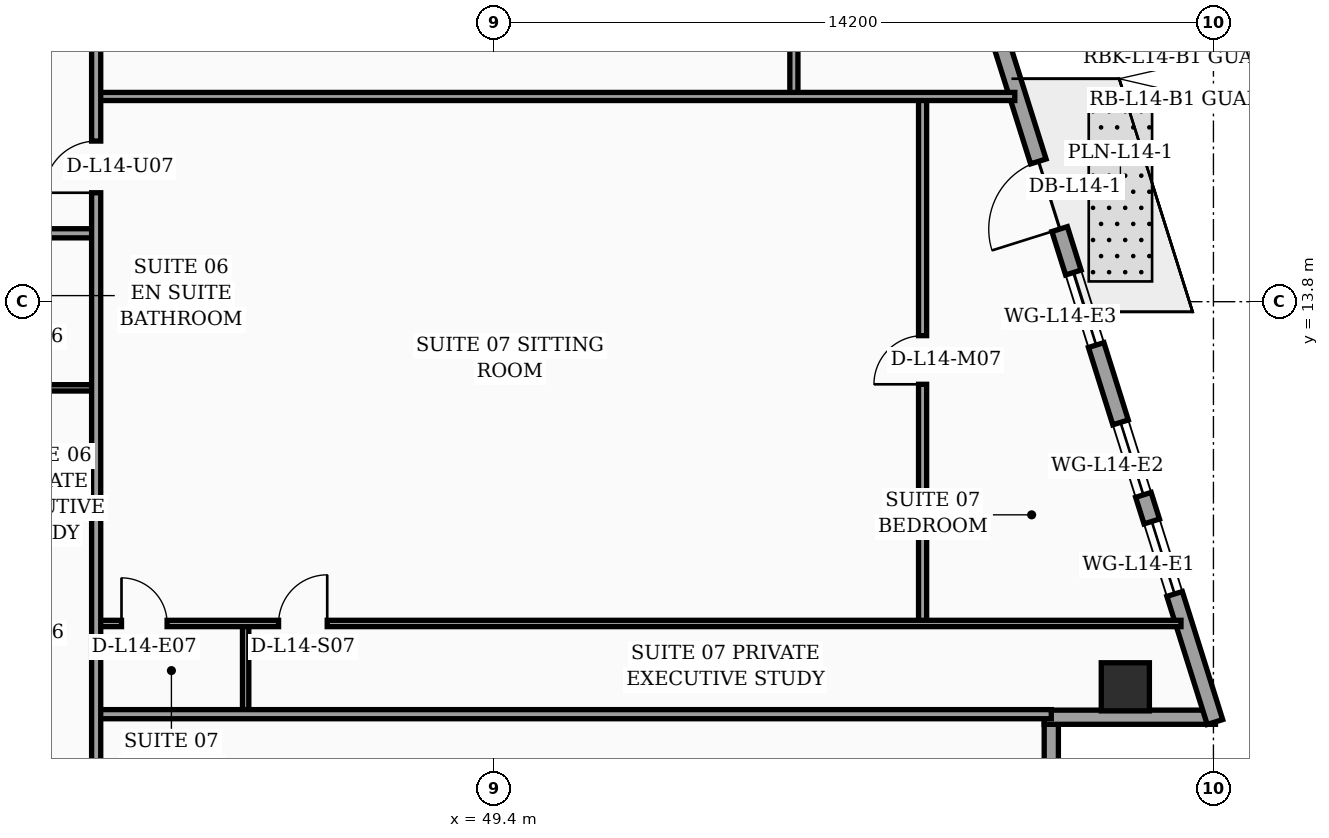
"""IFC4 building model, lengths in metres.
Left out: names, types, materials, properties, quantities, classifications, styles, units other than length and angle.
Written with IfcOpenShell. Run it as: python <this file> out.ifc"""

import sys

from ifc_helpers import new_model, si_unit, direction, frame, frame_2d, origin, origin_2d, place, context, subcontext, project, spatial, rectangle, hollow_rectangle, extrude, element, fill, save


model = new_model("IFC4")
c1 = context("Model", 3, precision=1e-05, world=origin(), true_north=direction((0.0, 1.0)))
c2 = subcontext(c1, "Body", "Model", "MODEL_VIEW")
j1 = project(units=[si_unit("LENGTHUNIT", "METRE"), si_unit("PLANEANGLEUNIT", "RADIAN")], contexts=[c1])
p1 = place(None, origin())
s1 = spatial("IfcSite", under=j1, at=p1, CompositionType="ELEMENT")
p2 = place(p1, origin())
s2 = spatial("IfcBuilding", under=s1, at=p2, CompositionType="ELEMENT")
p3 = place(p2, frame((0.0, 0.0, 62.2)))
s3 = spatial("IfcBuildingStorey", under=s2, at=p3, CompositionType="ELEMENT", Elevation=62.2)
p4 = place(p3, frame((61.861, 6.2, 0.0), z_axis=(0.0, 0.0, 1.0), x_axis=(1.0, 0.0, 0.0)))
e1 = element("IfcColumn", 1, at=p4, inside=s3, PredefinedType="COLUMN", context=c2, shape_type="SweptSolid", body=[
    extrude(hollow_rectangle(XDim=0.95, YDim=0.95, WallThickness=0.04, at=origin_2d()), origin(), (0.0, 0.0, 1.0), 3.56),
])
p5 = place(p3, frame((60.4, 2.52, 0.0), z_axis=(0.0, 0.0, 1.0), x_axis=(0.0, 1.0, 0.0)))
e2 = element("IfcWall", 2, at=p5, inside=s3, PredefinedType="SOLIDWALL", context=c2, shape_type="SweptSolid", body=[
    extrude(rectangle(XDim=2.94, YDim=0.28, at=frame_2d((1.47, 0.0))), origin(), (0.0, 0.0, 1.0), 3.04),
])
p6 = place(p3, frame((60.26, 5.6, 0.0), z_axis=(0.0, 0.0, 1.0), x_axis=(1.0, 0.0, 0.0)))
e3 = element("IfcWall", 3, at=p6, inside=s3, PredefinedType="SOLIDWALL", context=c2, shape_type="SweptSolid", body=[
    extrude(rectangle(XDim=3.38, YDim=0.28, at=frame_2d((1.69, 0.0))), origin(), (0.0, 0.0, 1.0), 3.04),
])
p7 = place(p3, frame((63.63, 5.505, 0.0), z_axis=(0.0, 0.0, 1.0), x_axis=(-0.300501856448, 0.953781229775, 0.0)))
e4 = element("IfcWall", 4, at=p7, inside=s3, PredefinedType="SOLIDWALL", context=c2, shape_type="SweptSolid", body=[
    extrude(rectangle(XDim=30.814, YDim=0.32, at=frame_2d((15.407, 0.0))), origin(), (0.0, 0.0, 1.0), 3.56),
])
p8 = place(p7, frame((10.199, 0.0, 0.0)))
e5 = element("IfcOpeningElement", 5, at=p8, cuts=e4, PredefinedType="OPENING", context=c2, shape_type="SweptSolid", body=[
    extrude(rectangle(XDim=1.4, YDim=2.25, at=frame_2d((0.7, 1.125))), frame((0.0, 0.17, 0.0), z_axis=(0.0, -1.0, 0.0), x_axis=(1.0, 0.0, 0.0)), (0.0, 0.0, 1.0), 0.34),
])
p9 = place(p7, frame((2.65, 0.0, 0.75)))
e6 = element("IfcOpeningElement", 6, at=p9, cuts=e4, PredefinedType="OPENING", context=c2, shape_type="SweptSolid", body=[
    extrude(rectangle(XDim=1.5, YDim=1.6, at=frame_2d((0.75, 0.8))), frame((0.0, 0.17, 0.0), z_axis=(0.0, -1.0, 0.0), x_axis=(1.0, 0.0, 0.0)), (0.0, 0.0, 1.0), 0.34),
])
p10 = place(p7, frame((4.7, 0.0, 0.75)))
e7 = element("IfcOpeningElement", 7, at=p10, cuts=e4, PredefinedType="OPENING", context=c2, shape_type="SweptSolid", body=[
    extrude(rectangle(XDim=1.5, YDim=1.6, at=frame_2d((0.75, 0.8))), frame((0.0, 0.17, 0.0), z_axis=(0.0, -1.0, 0.0), x_axis=(1.0, 0.0, 0.0)), (0.0, 0.0, 1.0), 0.34),
])
p11 = place(p7, frame((7.8, 0.0, 0.75)))
e8 = element("IfcOpeningElement", 8, at=p11, cuts=e4, PredefinedType="OPENING", context=c2, shape_type="SweptSolid", body=[
    extrude(rectangle(XDim=1.5, YDim=1.6, at=frame_2d((0.75, 0.8))), frame((0.0, 0.17, 0.0), z_axis=(0.0, -1.0, 0.0), x_axis=(1.0, 0.0, 0.0)), (0.0, 0.0, 1.0), 0.34),
])
p12 = place(p7, frame((14.0, 0.0, 0.75)))
e9 = element("IfcOpeningElement", 9, at=p12, cuts=e4, PredefinedType="OPENING", context=c2, shape_type="SweptSolid", body=[
    extrude(rectangle(XDim=1.5, YDim=1.6, at=frame_2d((0.75, 0.8))), frame((0.0, 0.17, 0.0), z_axis=(0.0, -1.0, 0.0), x_axis=(1.0, 0.0, 0.0)), (0.0, 0.0, 1.0), 0.34),
])
p13 = place(p7, frame((17.1, 0.0, 0.75)))
e10 = element("IfcOpeningElement", 10, at=p13, cuts=e4, PredefinedType="OPENING", context=c2, shape_type="SweptSolid", body=[
    extrude(rectangle(XDim=1.5, YDim=1.6, at=frame_2d((0.75, 0.8))), frame((0.0, 0.17, 0.0), z_axis=(0.0, -1.0, 0.0), x_axis=(1.0, 0.0, 0.0)), (0.0, 0.0, 1.0), 0.34),
])
p14 = place(p7, frame((23.3, 0.0, 0.75)))
e11 = element("IfcOpeningElement", 11, at=p14, cuts=e4, PredefinedType="OPENING", context=c2, shape_type="SweptSolid", body=[
    extrude(rectangle(XDim=1.5, YDim=1.6, at=frame_2d((0.75, 0.8))), frame((0.0, 0.17, 0.0), z_axis=(0.0, -1.0, 0.0), x_axis=(1.0, 0.0, 0.0)), (0.0, 0.0, 1.0), 0.34),
])
p15 = place(p7, frame((27.45, 0.0, 0.75)))
e12 = element("IfcOpeningElement", 12, at=p15, cuts=e4, PredefinedType="OPENING", context=c2, shape_type="SweptSolid", body=[
    extrude(rectangle(XDim=1.5, YDim=1.6, at=frame_2d((0.75, 0.8))), frame((0.0, 0.17, 0.0), z_axis=(0.0, -1.0, 0.0), x_axis=(1.0, 0.0, 0.0)), (0.0, 0.0, 1.0), 0.34),
])
p16 = place(p3, frame((39.42, 12.1, 0.0), z_axis=(0.0, 0.0, 1.0), x_axis=(1.0, 0.0, 0.0)))
e13 = element("IfcWall", 13, at=p16, inside=s3, PredefinedType="PARTITIONING", context=c2, shape_type="SweptSolid", body=[
    extrude(rectangle(XDim=2.13, YDim=0.125, at=frame_2d((1.065, 0.0))), origin(), (0.0, 0.0, 1.0), 3.56),
])
p17 = place(p3, frame((32.4, 15.15, 0.0), z_axis=(0.0, 0.0, 1.0), x_axis=(1.0, 0.0, 0.0)))
e14 = element("IfcWall", 14, at=p17, inside=s3, PredefinedType="PARTITIONING", context=c2, shape_type="SweptSolid", body=[
    extrude(rectangle(XDim=9.15, YDim=0.18, at=frame_2d((4.575, 0.0))), origin(), (0.0, 0.0, 1.0), 2.84),
])
p18 = place(p17, frame((3.1, 0.0, 0.0)))
e15 = element("IfcOpeningElement", 15, at=p18, cuts=e14, PredefinedType="OPENING", context=c2, shape_type="SweptSolid", body=[
    extrude(rectangle(XDim=1.02, YDim=2.2, at=frame_2d((0.51, 1.1))), frame((0.0, 0.1, 0.0), z_axis=(0.0, -1.0, 0.0), x_axis=(1.0, 0.0, 0.0)), (0.0, 0.0, 1.0), 0.2),
])
p19 = place(p3, frame((44.5, 5.66, 0.0), z_axis=(0.0, 0.0, 1.0), x_axis=(0.0, 1.0, 0.0)))
e16 = element("IfcWall", 16, at=p19, inside=s3, PredefinedType="PARTITIONING", context=c2, shape_type="SweptSolid", body=[
    extrude(rectangle(XDim=1.79, YDim=0.125, at=frame_2d((0.895, 0.0))), origin(), (0.0, 0.0, 1.0), 3.56),
])
p20 = place(p3, frame((57.86, 7.45, 0.0), z_axis=(0.0, 0.0, 1.0), x_axis=(0.0, 1.0, 0.0)))
e17 = element("IfcWall", 17, at=p20, inside=s3, PredefinedType="PARTITIONING", context=c2, shape_type="SweptSolid", body=[
    extrude(rectangle(XDim=10.4, YDim=0.16, at=frame_2d((5.2, 0.0))), origin(), (0.0, 0.0, 1.0), 3.04),
])
p21 = place(p20, frame((4.72, 0.0, 0.0)))
e18 = element("IfcOpeningElement", 18, at=p21, cuts=e17, PredefinedType="OPENING", context=c2, shape_type="SweptSolid", body=[
    extrude(rectangle(XDim=0.96, YDim=2.2, at=frame_2d((0.48, 1.1))), frame((0.0, 0.09, 0.0), z_axis=(0.0, -1.0, 0.0), x_axis=(1.0, 0.0, 0.0)), (0.0, 0.0, 1.0), 0.18),
])
p22 = place(p3, frame((41.55, 7.45, 0.0), z_axis=(0.0, 0.0, 1.0), x_axis=(1.0, 0.0, 0.0)))
e19 = element("IfcWall", 19, at=p22, inside=s3, PredefinedType="PARTITIONING", context=c2, shape_type="SweptSolid", body=[
    extrude(rectangle(XDim=21.41, YDim=0.125, at=frame_2d((10.705, 0.0))), origin(), (0.0, 0.0, 1.0), 2.84),
])
p23 = place(p22, frame((0.5, 0.0, 0.0)))
e20 = element("IfcOpeningElement", 20, at=p23, cuts=e19, PredefinedType="OPENING", context=c2, shape_type="SweptSolid", body=[
    extrude(rectangle(XDim=0.9, YDim=2.15, at=frame_2d((0.45, 1.075))), frame((0.0, 0.073, 0.0), z_axis=(0.0, -1.0, 0.0), x_axis=(1.0, 0.0, 0.0)), (0.0, 0.0, 1.0), 0.145),
])
p24 = place(p22, frame((3.6, 0.0, 0.0)))
e21 = element("IfcOpeningElement", 21, at=p24, cuts=e19, PredefinedType="OPENING", context=c2, shape_type="SweptSolid", body=[
    extrude(rectangle(XDim=0.96, YDim=2.2, at=frame_2d((0.48, 1.1))), frame((0.0, 0.073, 0.0), z_axis=(0.0, -1.0, 0.0), x_axis=(1.0, 0.0, 0.0)), (0.0, 0.0, 1.0), 0.145),
])
p25 = place(p3, frame((41.55, 5.66, 0.0), z_axis=(0.0, 0.0, 1.0), x_axis=(1.0, 0.0, 0.0)))
e22 = element("IfcWall", 22, at=p25, inside=s3, PredefinedType="PARTITIONING", context=c2, shape_type="SweptSolid", body=[
    extrude(rectangle(XDim=18.85, YDim=0.18, at=frame_2d((9.425, 0.0))), origin(), (0.0, 0.0, 1.0), 2.84),
])
p26 = place(p3, frame((55.32, 17.85, 0.0), z_axis=(0.0, 0.0, 1.0), x_axis=(0.0, 1.0, 0.0)))
e23 = element("IfcWall", 23, at=p26, inside=s3, PredefinedType="PARTITIONING", context=c2, shape_type="SweptSolid", body=[
    extrude(rectangle(XDim=5.74, YDim=0.16, at=frame_2d((2.87, 0.0))), origin(), (0.0, 0.0, 1.0), 2.84),
])
p27 = place(p26, frame((2.39, 0.0, 0.0)))
e24 = element("IfcOpeningElement", 24, at=p27, cuts=e23, PredefinedType="OPENING", context=c2, shape_type="SweptSolid", body=[
    extrude(rectangle(XDim=0.96, YDim=2.2, at=frame_2d((0.48, 1.1))), frame((0.0, 0.09, 0.0), z_axis=(0.0, -1.0, 0.0), x_axis=(1.0, 0.0, 0.0)), (0.0, 0.0, 1.0), 0.18),
])
p28 = place(p3, frame((41.55, 17.85, 0.0), z_axis=(0.0, 0.0, 1.0), x_axis=(1.0, 0.0, 0.0)))
e25 = element("IfcWall", 25, at=p28, inside=s3, PredefinedType="PARTITIONING", context=c2, shape_type="SweptSolid", body=[
    extrude(rectangle(XDim=18.13, YDim=0.16, at=frame_2d((9.065, 0.0))), origin(), (0.0, 0.0, 1.0), 2.84),
])
p29 = place(p3, frame((41.55, 2.44, 0.0), z_axis=(0.0, 0.0, 1.0), x_axis=(0.0, 1.0, 0.0)))
e26 = element("IfcWall", 26, at=p29, inside=s3, PredefinedType="PARTITIONING", context=c2, shape_type="SweptSolid", body=[
    extrude(rectangle(XDim=31.04, YDim=0.18, at=frame_2d((15.52, 0.0))), origin(), (0.0, 0.0, 1.0), 2.84),
])
p30 = place(p29, frame((13.51, 0.0, 0.0)))
e27 = element("IfcOpeningElement", 27, at=p30, cuts=e26, PredefinedType="OPENING", context=c2, shape_type="SweptSolid", body=[
    extrude(rectangle(XDim=1.02, YDim=2.2, at=frame_2d((0.51, 1.1))), frame((0.0, 0.1, 0.0), z_axis=(0.0, -1.0, 0.0), x_axis=(1.0, 0.0, 0.0)), (0.0, 0.0, 1.0), 0.2),
])
p31 = place(p29, frame((17.77, 0.0, 0.0)))
e28 = element("IfcOpeningElement", 28, at=p31, cuts=e26, PredefinedType="OPENING", context=c2, shape_type="SweptSolid", body=[
    extrude(rectangle(XDim=1.02, YDim=2.2, at=frame_2d((0.51, 1.1))), frame((0.0, 0.1, 0.0), z_axis=(0.0, -1.0, 0.0), x_axis=(1.0, 0.0, 0.0)), (0.0, 0.0, 1.0), 0.2),
])
p32 = place(p29, frame((25.58, 0.0, 0.0)))
e29 = element("IfcOpeningElement", 29, at=p32, cuts=e26, PredefinedType="OPENING", context=c2, shape_type="SweptSolid", body=[
    extrude(rectangle(XDim=1.02, YDim=2.2, at=frame_2d((0.51, 1.1))), frame((0.0, 0.1, 0.0), z_axis=(0.0, -1.0, 0.0), x_axis=(1.0, 0.0, 0.0)), (0.0, 0.0, 1.0), 0.2),
])
p33 = place(p8, origin())
e30 = element("IfcDoor", 30, at=p33, inside=s3, OperationType="SINGLE_SWING_LEFT", PredefinedType="DOOR", context=c2, shape_type="SweptSolid", body=[
    extrude(rectangle(XDim=1.4, YDim=2.25, at=frame_2d((0.7, 1.125))), frame((0.0, 0.025, 0.0), z_axis=(0.0, -1.0, 0.0), x_axis=(1.0, 0.0, 0.0)), (0.0, 0.0, 1.0), 0.05),
])
fill(e5, e30)
p34 = place(p9, origin())
e31 = element("IfcWindow", 31, at=p34, inside=s3, PartitioningType="SINGLE_PANEL", PredefinedType="WINDOW", context=c2, shape_type="SweptSolid", body=[
    extrude(rectangle(XDim=1.5, YDim=1.6, at=frame_2d((0.75, 0.8))), frame((0.0, 0.03, 0.0), z_axis=(0.0, -1.0, 0.0), x_axis=(1.0, 0.0, 0.0)), (0.0, 0.0, 1.0), 0.06),
])
fill(e6, e31)
p35 = place(p10, origin())
e32 = element("IfcWindow", 32, at=p35, inside=s3, PartitioningType="SINGLE_PANEL", PredefinedType="WINDOW", context=c2, shape_type="SweptSolid", body=[
    extrude(rectangle(XDim=1.5, YDim=1.6, at=frame_2d((0.75, 0.8))), frame((0.0, 0.03, 0.0), z_axis=(0.0, -1.0, 0.0), x_axis=(1.0, 0.0, 0.0)), (0.0, 0.0, 1.0), 0.06),
])
fill(e7, e32)
p36 = place(p11, origin())
e33 = element("IfcWindow", 33, at=p36, inside=s3, PartitioningType="SINGLE_PANEL", PredefinedType="WINDOW", context=c2, shape_type="SweptSolid", body=[
    extrude(rectangle(XDim=1.5, YDim=1.6, at=frame_2d((0.75, 0.8))), frame((0.0, 0.03, 0.0), z_axis=(0.0, -1.0, 0.0), x_axis=(1.0, 0.0, 0.0)), (0.0, 0.0, 1.0), 0.06),
])
fill(e8, e33)
p37 = place(p21, origin())
e34 = element("IfcDoor", 34, at=p37, inside=s3, OperationType="SINGLE_SWING_LEFT", PredefinedType="DOOR", context=c2, shape_type="SweptSolid", body=[
    extrude(rectangle(XDim=0.96, YDim=2.2, at=frame_2d((0.48, 1.1))), frame((0.0, 0.025, 0.0), z_axis=(0.0, -1.0, 0.0), x_axis=(1.0, 0.0, 0.0)), (0.0, 0.0, 1.0), 0.05),
])
fill(e18, e34)
p38 = place(p23, origin())
e35 = element("IfcDoor", 35, at=p38, inside=s3, OperationType="SINGLE_SWING_LEFT", PredefinedType="DOOR", context=c2, shape_type="SweptSolid", body=[
    extrude(rectangle(XDim=0.9, YDim=2.15, at=frame_2d((0.45, 1.075))), frame((0.0, 0.025, 0.0), z_axis=(0.0, -1.0, 0.0), x_axis=(1.0, 0.0, 0.0)), (0.0, 0.0, 1.0), 0.05),
])
fill(e20, e35)
p39 = place(p24, origin())
e36 = element("IfcDoor", 36, at=p39, inside=s3, OperationType="SINGLE_SWING_RIGHT", PredefinedType="DOOR", context=c2, shape_type="SweptSolid", body=[
    extrude(rectangle(XDim=0.96, YDim=2.2, at=frame_2d((0.48, 1.1))), frame((0.0, 0.025, 0.0), z_axis=(0.0, -1.0, 0.0), x_axis=(1.0, 0.0, 0.0)), (0.0, 0.0, 1.0), 0.05),
])
fill(e21, e36)
p40 = place(p30, origin())
e37 = element("IfcDoor", 37, at=p40, inside=s3, OperationType="SINGLE_SWING_LEFT", PredefinedType="DOOR", context=c2, shape_type="SweptSolid", body=[
    extrude(rectangle(XDim=1.02, YDim=2.2, at=frame_2d((0.51, 1.1))), frame((0.0, 0.025, 0.0), z_axis=(0.0, -1.0, 0.0), x_axis=(1.0, 0.0, 0.0)), (0.0, 0.0, 1.0), 0.05),
])
fill(e27, e37)
save(model, sys.argv[1])
